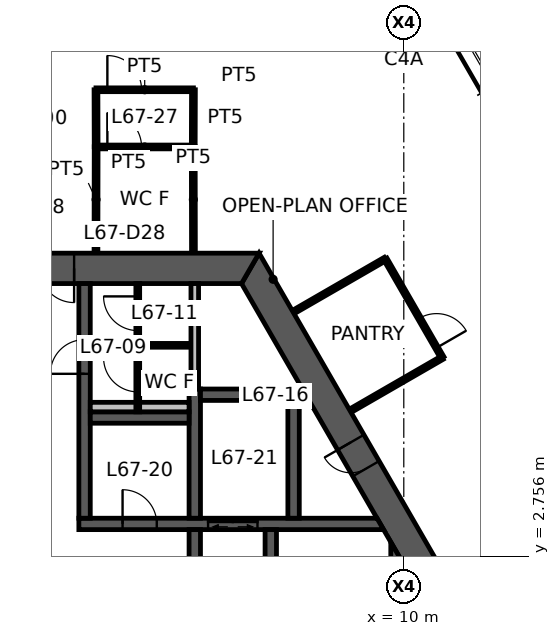
"""IFC4 building model, lengths in metres.
Left out: names, types, materials, properties, quantities, classifications, styles, units other than length and angle.
Written with IfcOpenShell. Run it as: python <this file> out.ifc"""

import sys

from ifc_helpers import new_model, si_unit, direction, frame, frame_2d, origin, place, context, subcontext, project, spatial, polyline, rectangle, outline, extrude, element, fill, save


model = new_model("IFC4")
c1 = context("Model", 3, precision=1e-05, world=origin(), true_north=direction((0.0, 1.0)))
c2 = subcontext(c1, "Body", "Model", "MODEL_VIEW")
j1 = project(units=[si_unit("LENGTHUNIT", "METRE"), si_unit("PLANEANGLEUNIT", "RADIAN")], contexts=[c1])
p1 = place(None, origin())
s1 = spatial("IfcSite", under=j1, at=p1, CompositionType="ELEMENT")
p2 = place(p1, origin())
s2 = spatial("IfcBuilding", under=s1, at=p2, CompositionType="ELEMENT")
p3 = place(p2, frame((0.0, 0.0, 267.4)))
s3 = spatial("IfcBuildingStorey", under=s2, at=p3, CompositionType="ELEMENT", Elevation=267.4)
p4 = place(p3, frame((11.922, 0.0, 0.0), z_axis=(0.0, 0.0, 1.0), x_axis=(-0.500004296715, 0.866022923061, 0.0)))
e1 = element("IfcWall", 1, at=p4, inside=s3, PredefinedType="SHEAR", context=c2, shape_type="SweptSolid", body=[
    extrude(outline(polyline([(-0.231, -0.4), (5.835, -0.4), (6.635, -0.4), (12.153, -0.4), (11.691, 0.4), (6.635, 0.4), (5.835, 0.4), (0.231, 0.4), (-0.231, -0.4)])), origin(), (0.0, 0.0, 1.0), 3.9),
])
p5 = place(p4, frame((5.835, 0.0, 0.0)))
e2 = element("IfcOpeningElement", 2, at=p5, cuts=e1, PredefinedType="OPENING", context=c2, shape_type="SweptSolid", body=[
    extrude(rectangle(XDim=0.8, YDim=2.1, at=frame_2d((0.4, 1.05))), frame((0.0, 0.41, 0.0), z_axis=(0.0, -1.0, 0.0), x_axis=(1.0, 0.0, 0.0)), (0.0, 0.0, 1.0), 0.82),
])
p6 = place(p3, frame((5.961, 10.325, 0.0), z_axis=(0.0, 0.0, 1.0), x_axis=(-1.0, 0.0, 0.0)))
e3 = element("IfcWall", 3, at=p6, inside=s3, PredefinedType="SHEAR", context=c2, shape_type="SweptSolid", body=[
    extrude(outline(polyline([(-0.231, -0.4), (4.636, -0.4), (5.536, -0.4), (6.386, -0.4), (7.286, -0.4), (12.153, -0.4), (11.691, 0.4), (7.286, 0.4), (6.386, 0.4), (5.536, 0.4), (4.636, 0.4), (0.231, 0.4), (-0.231, -0.4)])), origin(), (0.0, 0.0, 1.0), 3.9),
])
p7 = place(p6, frame((6.386, 0.0, 0.0)))
e4 = element("IfcOpeningElement", 4, at=p7, cuts=e3, PredefinedType="OPENING", context=c2, shape_type="SweptSolid", body=[
    extrude(rectangle(XDim=0.9, YDim=2.1, at=frame_2d((0.45, 1.05))), frame((0.0, 0.41, 0.0), z_axis=(0.0, -1.0, 0.0), x_axis=(1.0, 0.0, 0.0)), (0.0, 0.0, 1.0), 0.82),
])
p8 = place(p6, frame((4.636, 0.0, 0.0)))
e5 = element("IfcOpeningElement", 5, at=p8, cuts=e3, PredefinedType="OPENING", context=c2, shape_type="SweptSolid", body=[
    extrude(rectangle(XDim=0.9, YDim=2.1, at=frame_2d((0.45, 1.05))), frame((0.0, 0.41, 0.0), z_axis=(0.0, -1.0, 0.0), x_axis=(1.0, 0.0, 0.0)), (0.0, 0.0, 1.0), 0.82),
])
p9 = place(p3, frame((1.45, 3.6, 0.0), z_axis=(0.0, 0.0, 1.0), x_axis=(1.0, 0.0, 0.0)))
e6 = element("IfcWall", 6, at=p9, inside=s3, PredefinedType="SHEAR", context=c2, shape_type="SweptSolid", body=[
    extrude(outline(polyline([(0.0, -0.15), (1.15, -0.15), (2.05, -0.15), (3.4, -0.15), (4.7, -0.15), (8.019, -0.15), (7.845, 0.15), (4.7, 0.15), (3.4, 0.15), (2.05, 0.15), (1.15, 0.15), (0.0, 0.15), (0.0, -0.15)])), origin(), (0.0, 0.0, 1.0), 3.9),
])
p10 = place(p9, frame((1.15, 0.0, 0.0)))
e7 = element("IfcOpeningElement", 7, at=p10, cuts=e6, PredefinedType="OPENING", context=c2, shape_type="SweptSolid", body=[
    extrude(rectangle(XDim=0.9, YDim=2.1, at=frame_2d((0.45, 1.05))), frame((0.0, 0.16, 0.0), z_axis=(0.0, -1.0, 0.0), x_axis=(1.0, 0.0, 0.0)), (0.0, 0.0, 1.0), 0.32),
])
p11 = place(p9, frame((3.4, 0.0, 0.0)))
e8 = element("IfcOpeningElement", 8, at=p11, cuts=e6, PredefinedType="OPENING", context=c2, shape_type="SweptSolid", body=[
    extrude(rectangle(XDim=1.3, YDim=2.1, at=frame_2d((0.65, 1.05))), frame((0.0, 0.16, 0.0), z_axis=(0.0, -1.0, 0.0), x_axis=(1.0, 0.0, 0.0)), (0.0, 0.0, 1.0), 0.32),
])
p12 = place(p3, frame((1.6, 3.75, 0.0), z_axis=(0.0, 0.0, 1.0), x_axis=(0.0, 1.0, 0.0)))
e9 = element("IfcWall", 9, at=p12, inside=s3, PredefinedType="SHEAR", context=c2, shape_type="SweptSolid", body=[
    extrude(rectangle(XDim=6.175, YDim=0.3, at=frame_2d((3.087, 0.0))), origin(), (0.0, 0.0, 1.0), 3.9),
])
p13 = place(p12, frame((3.8, 0.0, 0.0)))
e10 = element("IfcOpeningElement", 10, at=p13, cuts=e9, PredefinedType="OPENING", context=c2, shape_type="SweptSolid", body=[
    extrude(rectangle(XDim=0.9, YDim=2.1, at=frame_2d((0.45, 1.05))), frame((0.0, 0.16, 0.0), z_axis=(0.0, -1.0, 0.0), x_axis=(1.0, 0.0, 0.0)), (0.0, 0.0, 1.0), 0.32),
])
p14 = place(p3, frame((4.5, -3.45, 0.0), z_axis=(0.0, 0.0, 1.0), x_axis=(0.0, 1.0, 0.0)))
e11 = element("IfcWall", 11, at=p14, inside=s3, PredefinedType="SHEAR", context=c2, shape_type="SweptSolid", body=[
    extrude(rectangle(XDim=6.9, YDim=0.3, at=frame_2d((3.45, 0.0))), origin(), (0.0, 0.0, 1.0), 3.9),
])
p15 = place(p14, frame((2.95, 0.0, 0.0)))
e12 = element("IfcOpeningElement", 12, at=p15, cuts=e11, PredefinedType="OPENING", context=c2, shape_type="SweptSolid", body=[
    extrude(rectangle(XDim=1.0, YDim=2.1, at=frame_2d((0.5, 1.05))), frame((0.0, 0.16, 0.0), z_axis=(0.0, -1.0, 0.0), x_axis=(1.0, 0.0, 0.0)), (0.0, 0.0, 1.0), 0.32),
])
p16 = place(p3, frame((6.5, -3.45, 0.0), z_axis=(0.0, 0.0, 1.0), x_axis=(0.0, 1.0, 0.0)))
e13 = element("IfcWall", 13, at=p16, inside=s3, PredefinedType="SHEAR", context=c2, shape_type="SweptSolid", body=[
    extrude(rectangle(XDim=6.9, YDim=0.3, at=frame_2d((3.45, 0.0))), origin(), (0.0, 0.0, 1.0), 3.9),
])
p17 = place(p16, frame((0.1, 0.0, 0.0)))
e14 = element("IfcOpeningElement", 14, at=p17, cuts=e13, PredefinedType="OPENING", context=c2, shape_type="SweptSolid", body=[
    extrude(rectangle(XDim=1.0, YDim=2.1, at=frame_2d((0.5, 1.05))), frame((0.0, 0.16, 0.0), z_axis=(0.0, -1.0, 0.0), x_axis=(1.0, 0.0, 0.0)), (0.0, 0.0, 1.0), 0.32),
])
p18 = place(p3, frame((4.5, 3.75, 0.0), z_axis=(0.0, 0.0, 1.0), x_axis=(0.0, 1.0, 0.0)))
e15 = element("IfcWall", 15, at=p18, inside=s3, PredefinedType="SHEAR", context=c2, shape_type="SweptSolid", body=[
    extrude(rectangle(XDim=3.4, YDim=0.3, at=frame_2d((1.7, 0.0))), origin(), (0.0, 0.0, 1.0), 3.9),
])
for number, where, z_axis, x_axis in (
    (16, (1.75, 6.4, 0.0), (0.0, 0.0, 1.0), (1.0, 0.0, 0.0)),
    (17, (4.65, 7.0, 0.0), (0.0, 0.0, 1.0), (1.0, 0.0, 0.0)),
):
    element("IfcWall", number, at=place(p3, frame(where, z_axis=z_axis, x_axis=x_axis)), inside=s3, PredefinedType="SHEAR", context=c2, shape_type="SweptSolid", body=[
        extrude(rectangle(XDim=2.6, YDim=0.3, at=frame_2d((1.3, 0.0))), origin(), (0.0, 0.0, 1.0), 3.9),
    ])
p19 = place(p3, frame((7.1, 3.75, 0.0), z_axis=(0.0, 0.0, 1.0), x_axis=(0.0, 1.0, 0.0)))
e18 = element("IfcWall", 18, at=p19, inside=s3, PredefinedType="SHEAR", context=c2, shape_type="SweptSolid", body=[
    extrude(rectangle(XDim=3.1, YDim=0.3, at=frame_2d((1.55, 0.0))), origin(), (0.0, 0.0, 1.0), 3.9),
])
p20 = place(p3, frame((9.808, -2.862, 0.0), z_axis=(0.0, 0.0, 1.0), x_axis=(0.0, 1.0, 0.0)))
e19 = element("IfcWall", 19, at=p20, inside=s3, PredefinedType="SHEAR", context=c2, shape_type="SweptSolid", body=[
    extrude(outline(polyline([(0.26, -0.15), (5.465, -0.15), (5.984, 0.15), (-0.26, 0.15), (0.26, -0.15)])), origin(), (0.0, 0.0, 1.0), 3.9),
])
p21 = place(p3, frame((4.5, 7.15, 0.0), z_axis=(0.0, 0.0, 1.0), x_axis=(0.0, 1.0, 0.0)))
e20 = element("IfcWall", 20, at=p21, inside=s3, PredefinedType="STANDARD", context=c2, shape_type="SweptSolid", body=[
    extrude(rectangle(XDim=2.775, YDim=0.2, at=frame_2d((1.388, 0.0))), origin(), (0.0, 0.0, 1.0), 3.9),
])
p22 = place(p3, frame((1.75, 6.675, 0.0), z_axis=(0.0, 0.0, 1.0), x_axis=(1.0, 0.0, 0.0)))
e21 = element("IfcWall", 21, at=p22, inside=s3, PredefinedType="PLUMBINGWALL", context=c2, shape_type="SweptSolid", body=[
    extrude(rectangle(XDim=2.6, YDim=0.25, at=frame_2d((1.3, 0.0))), origin(), (0.0, 0.0, 1.0), 3.9),
])
p23 = place(p3, frame((3.0, 6.55, 0.0), z_axis=(0.0, 0.0, 1.0), x_axis=(0.0, 1.0, 0.0)))
e22 = element("IfcWall", 22, at=p23, inside=s3, PredefinedType="PARTITIONING", context=c2, shape_type="SweptSolid", body=[
    extrude(rectangle(XDim=3.375, YDim=0.1, at=frame_2d((1.688, 0.0))), origin(), (0.0, 0.0, 1.0), 2.95),
])
p24 = place(p23, frame((0.525, 0.0, 0.0)))
e23 = element("IfcOpeningElement", 23, at=p24, cuts=e22, PredefinedType="OPENING", context=c2, shape_type="SweptSolid", body=[
    extrude(rectangle(XDim=0.9, YDim=2.1, at=frame_2d((0.45, 1.05))), frame((0.0, 0.06, 0.0), z_axis=(0.0, -1.0, 0.0), x_axis=(1.0, 0.0, 0.0)), (0.0, 0.0, 1.0), 0.12),
])
p25 = place(p23, frame((2.137, 0.0, 0.0)))
e24 = element("IfcOpeningElement", 24, at=p25, cuts=e22, PredefinedType="OPENING", context=c2, shape_type="SweptSolid", body=[
    extrude(rectangle(XDim=0.9, YDim=2.1, at=frame_2d((0.45, 1.05))), frame((0.0, 0.06, 0.0), z_axis=(0.0, -1.0, 0.0), x_axis=(1.0, 0.0, 0.0)), (0.0, 0.0, 1.0), 0.12),
])
p26 = place(p3, frame((3.05, 8.3, 0.0), z_axis=(0.0, 0.0, 1.0), x_axis=(1.0, 0.0, 0.0)))
e25 = element("IfcWall", 25, at=p26, inside=s3, PredefinedType="PARTITIONING", context=c2, shape_type="SweptSolid", body=[
    extrude(rectangle(XDim=1.3, YDim=0.1, at=frame_2d((0.65, 0.0))), origin(), (0.0, 0.0, 1.0), 2.95),
])
p27 = place(p3, frame((1.9, 13.52, 0.0), z_axis=(0.0, 0.0, 1.0), x_axis=(1.0, 0.0, 0.0)))
e26 = element("IfcWall", 26, at=p27, inside=s3, PredefinedType="PARTITIONING", context=c2, shape_type="SweptSolid", body=[
    extrude(rectangle(XDim=2.565, YDim=0.1, at=frame_2d((1.283, 0.0))), origin(), (0.0, 0.0, 1.0), 2.95),
])
p28 = place(p27, frame((0.3, 0.0, 0.0)))
e27 = element("IfcOpeningElement", 27, at=p28, cuts=e26, PredefinedType="OPENING", context=c2, shape_type="SweptSolid", body=[
    extrude(rectangle(XDim=0.9, YDim=2.1, at=frame_2d((0.45, 1.05))), frame((0.0, 0.06, 0.0), z_axis=(0.0, -1.0, 0.0), x_axis=(1.0, 0.0, 0.0)), (0.0, 0.0, 1.0), 0.12),
])
for number, where, z_axis, x_axis in (
    (28, (1.9, 10.745, 0.0), (0.0, 0.0, 1.0), (0.002, 1.0, 0.0)),
    (29, (4.46, 13.525, 0.0), (0.0, 0.0, 1.0), (0.002, -1.0, 0.0)),
):
    element("IfcWall", number, at=place(p3, frame(where, z_axis=z_axis, x_axis=x_axis)), inside=s3, PredefinedType="PARTITIONING", context=c2, shape_type="SweptSolid", body=[
        extrude(rectangle(XDim=2.78, YDim=0.1, at=frame_2d((1.39, 0.0))), origin(), (0.0, 0.0, 1.0), 2.95),
    ])
p29 = place(p3, frame((1.9, 15.025, 0.0), z_axis=(0.0, 0.0, 1.0), x_axis=(1.0, 0.0, 0.0)))
e30 = element("IfcWall", 30, at=p29, inside=s3, PredefinedType="PARTITIONING", context=c2, shape_type="SweptSolid", body=[
    extrude(rectangle(XDim=2.565, YDim=0.1, at=frame_2d((1.283, 0.0))), origin(), (0.0, 0.0, 1.0), 2.95),
])
p30 = place(p29, frame((0.3, 0.0, 0.0)))
e31 = element("IfcOpeningElement", 31, at=p30, cuts=e30, PredefinedType="OPENING", context=c2, shape_type="SweptSolid", body=[
    extrude(rectangle(XDim=0.9, YDim=2.1, at=frame_2d((0.45, 1.05))), frame((0.0, 0.06, 0.0), z_axis=(0.0, -1.0, 0.0), x_axis=(1.0, 0.0, 0.0)), (0.0, 0.0, 1.0), 0.12),
])
for number, where, z_axis, x_axis in (
    (32, (1.905, 13.525, 0.0), (0.0, 0.0, 1.0), (-0.003, 1.0, 0.0)),
    (33, (4.465, 15.025, 0.0), (0.0, 0.0, 1.0), (-0.003, -1.0, 0.0)),
):
    element("IfcWall", number, at=place(p3, frame(where, z_axis=z_axis, x_axis=x_axis)), inside=s3, PredefinedType="PARTITIONING", context=c2, shape_type="SweptSolid", body=[
        extrude(rectangle(XDim=1.5, YDim=0.1, at=frame_2d((0.75, 0.0))), origin(), (0.0, 0.0, 1.0), 2.95),
    ])
p31 = place(p3, frame((7.105, 9.183, 0.0), z_axis=(0.0, 0.0, 1.0), x_axis=(0.86603494908, 0.499983466698, 0.0)))
e34 = element("IfcWall", 34, at=p31, inside=s3, PredefinedType="PARTITIONING", context=c2, shape_type="SweptSolid", body=[
    extrude(rectangle(XDim=2.78, YDim=0.1, at=frame_2d((1.39, 0.0))), origin(), (0.0, 0.0, 1.0), 2.95),
])
p32 = place(p3, frame((9.513, 10.573, 0.0), z_axis=(0.0, 0.0, 1.0), x_axis=(0.499990139034, -0.866031096941, 0.0)))
e35 = element("IfcWall", 35, at=p32, inside=s3, PredefinedType="PARTITIONING", context=c2, shape_type="SweptSolid", body=[
    extrude(rectangle(XDim=3.0, YDim=0.1, at=frame_2d((1.5, 0.0))), origin(), (0.0, 0.0, 1.0), 2.95),
])
p33 = place(p32, frame((1.8, 0.0, 0.0)))
e36 = element("IfcOpeningElement", 36, at=p33, cuts=e35, PredefinedType="OPENING", context=c2, shape_type="SweptSolid", body=[
    extrude(rectangle(XDim=0.9, YDim=2.1, at=frame_2d((0.45, 1.05))), frame((0.0, 0.06, 0.0), z_axis=(0.0, -1.0, 0.0), x_axis=(1.0, 0.0, 0.0)), (0.0, 0.0, 1.0), 0.12),
])
p34 = place(p3, frame((11.013, 7.975, 0.0), z_axis=(0.0, 0.0, 1.0), x_axis=(-0.86603494908, -0.499983466698, 0.0)))
e37 = element("IfcWall", 37, at=p34, inside=s3, PredefinedType="PARTITIONING", context=c2, shape_type="SweptSolid", body=[
    extrude(rectangle(XDim=2.78, YDim=0.1, at=frame_2d((1.39, 0.0))), origin(), (0.0, 0.0, 1.0), 2.95),
])
p35 = place(p8, origin())
e38 = element("IfcDoor", 38, at=p35, inside=s3, OperationType="SINGLE_SWING_LEFT", PredefinedType="DOOR", context=c2, shape_type="SweptSolid", body=[
    extrude(rectangle(XDim=0.9, YDim=2.1, at=frame_2d((0.45, 1.05))), frame((0.0, 0.025, 0.0), z_axis=(0.0, -1.0, 0.0), x_axis=(1.0, 0.0, 0.0)), (0.0, 0.0, 1.0), 0.05),
])
fill(e5, e38)
p36 = place(p5, origin())
e39 = element("IfcDoor", 39, at=p36, inside=s3, OperationType="SINGLE_SWING_RIGHT", PredefinedType="DOOR", context=c2, shape_type="SweptSolid", body=[
    extrude(rectangle(XDim=0.8, YDim=2.1, at=frame_2d((0.4, 1.05))), frame((0.0, 0.025, 0.0), z_axis=(0.0, -1.0, 0.0), x_axis=(1.0, 0.0, 0.0)), (0.0, 0.0, 1.0), 0.05),
])
fill(e2, e39)
p37 = place(p13, origin())
e40 = element("IfcDoor", 40, at=p37, inside=s3, OperationType="SINGLE_SWING_LEFT", PredefinedType="DOOR", context=c2, shape_type="SweptSolid", body=[
    extrude(rectangle(XDim=0.9, YDim=2.1, at=frame_2d((0.45, 1.05))), frame((0.0, 0.025, 0.0), z_axis=(0.0, -1.0, 0.0), x_axis=(1.0, 0.0, 0.0)), (0.0, 0.0, 1.0), 0.05),
])
fill(e10, e40)
p38 = place(p10, origin())
e41 = element("IfcDoor", 41, at=p38, inside=s3, OperationType="SINGLE_SWING_LEFT", PredefinedType="DOOR", context=c2, shape_type="SweptSolid", body=[
    extrude(rectangle(XDim=0.9, YDim=2.1, at=frame_2d((0.45, 1.05))), frame((0.0, 0.025, 0.0), z_axis=(0.0, -1.0, 0.0), x_axis=(1.0, 0.0, 0.0)), (0.0, 0.0, 1.0), 0.05),
])
fill(e7, e41)
p39 = place(p24, origin())
e42 = element("IfcDoor", 42, at=p39, inside=s3, OperationType="SINGLE_SWING_RIGHT", PredefinedType="DOOR", context=c2, shape_type="SweptSolid", body=[
    extrude(rectangle(XDim=0.9, YDim=2.1, at=frame_2d((0.45, 1.05))), frame((0.0, 0.025, 0.0), z_axis=(0.0, -1.0, 0.0), x_axis=(1.0, 0.0, 0.0)), (0.0, 0.0, 1.0), 0.05),
])
fill(e23, e42)
p40 = place(p25, origin())
e43 = element("IfcDoor", 43, at=p40, inside=s3, OperationType="SINGLE_SWING_RIGHT", PredefinedType="DOOR", context=c2, shape_type="SweptSolid", body=[
    extrude(rectangle(XDim=0.9, YDim=2.1, at=frame_2d((0.45, 1.05))), frame((0.0, 0.025, 0.0), z_axis=(0.0, -1.0, 0.0), x_axis=(1.0, 0.0, 0.0)), (0.0, 0.0, 1.0), 0.05),
])
fill(e24, e43)
p41 = place(p28, origin())
e44 = element("IfcDoor", 44, at=p41, inside=s3, OperationType="SINGLE_SWING_LEFT", PredefinedType="DOOR", context=c2, shape_type="SweptSolid", body=[
    extrude(rectangle(XDim=0.9, YDim=2.1, at=frame_2d((0.45, 1.05))), frame((0.0, 0.025, 0.0), z_axis=(0.0, -1.0, 0.0), x_axis=(1.0, 0.0, 0.0)), (0.0, 0.0, 1.0), 0.05),
])
fill(e27, e44)
p42 = place(p30, origin())
e45 = element("IfcDoor", 45, at=p42, inside=s3, OperationType="SINGLE_SWING_LEFT", PredefinedType="DOOR", context=c2, shape_type="SweptSolid", body=[
    extrude(rectangle(XDim=0.9, YDim=2.1, at=frame_2d((0.45, 1.05))), frame((0.0, 0.025, 0.0), z_axis=(0.0, -1.0, 0.0), x_axis=(1.0, 0.0, 0.0)), (0.0, 0.0, 1.0), 0.05),
])
fill(e31, e45)
p43 = place(p33, origin())
e46 = element("IfcDoor", 46, at=p43, inside=s3, OperationType="SINGLE_SWING_RIGHT", PredefinedType="DOOR", context=c2, shape_type="SweptSolid", body=[
    extrude(rectangle(XDim=0.9, YDim=2.1, at=frame_2d((0.45, 1.05))), frame((0.0, 0.025, 0.0), z_axis=(0.0, -1.0, 0.0), x_axis=(1.0, 0.0, 0.0)), (0.0, 0.0, 1.0), 0.05),
])
fill(e36, e46)
p44 = place(p11, origin())
e47 = element("IfcDoor", 47, at=p44, inside=s3, OperationType="DOUBLE_DOOR_SLIDING", PredefinedType="DOOR", context=c2, shape_type="SweptSolid", body=[
    extrude(rectangle(XDim=1.3, YDim=2.1, at=frame_2d((0.65, 1.05))), frame((0.0, 0.025, 0.0), z_axis=(0.0, -1.0, 0.0), x_axis=(1.0, 0.0, 0.0)), (0.0, 0.0, 1.0), 0.05),
])
fill(e8, e47)
save(model, sys.argv[1])
